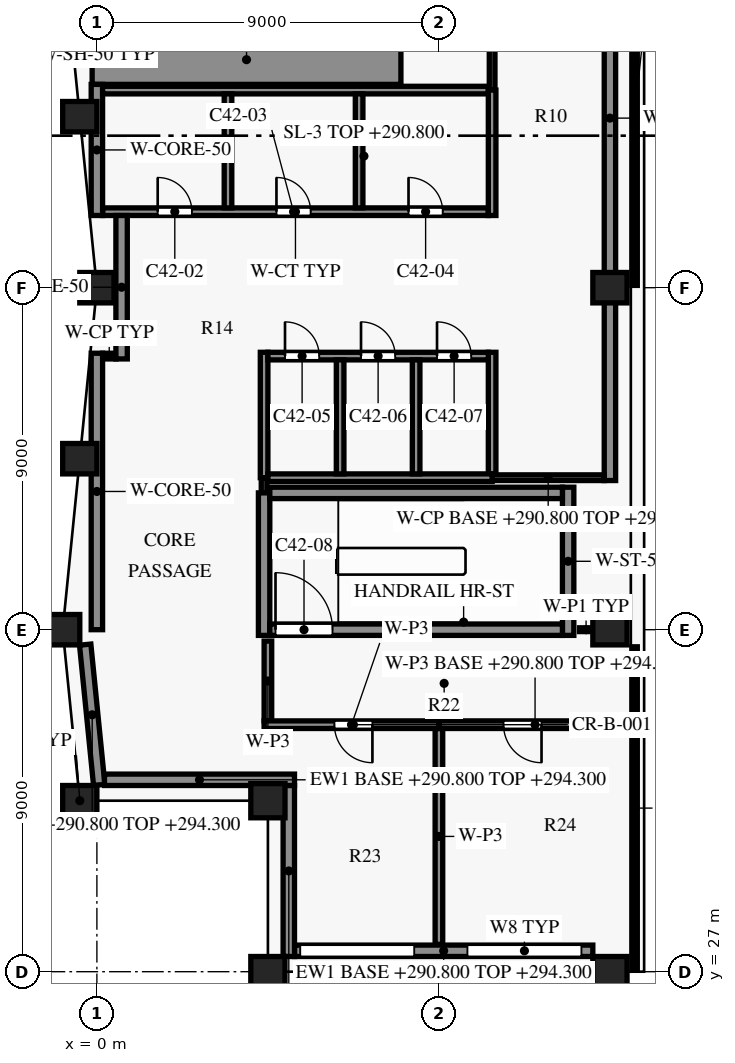
"""IFC4 building model, lengths in metres.
Left out: names, types, materials, properties, quantities, classifications, styles, units other than length and angle.
Written with IfcOpenShell. Run it as: python <this file> out.ifc"""

import sys

from ifc_helpers import new_model, si_unit, direction, frame, frame_2d, origin, origin_2d, place, context, subcontext, project, spatial, rectangle, extrude, element, fill, save


model = new_model("IFC4")
c1 = context("Model", 3, precision=1e-05, world=origin(), true_north=direction((0.0, 1.0)))
c2 = subcontext(c1, "Body", "Model", "MODEL_VIEW")
j1 = project(units=[si_unit("LENGTHUNIT", "METRE"), si_unit("PLANEANGLEUNIT", "RADIAN")], contexts=[c1])
p1 = place(None, origin())
s1 = spatial("IfcSite", under=j1, at=p1, CompositionType="ELEMENT")
p2 = place(p1, origin())
s2 = spatial("IfcBuilding", under=s1, at=p2, CompositionType="ELEMENT")
p3 = place(p2, frame((0.0, 0.0, 290.8)))
s3 = spatial("IfcBuildingStorey", under=s2, at=p3, CompositionType="ELEMENT", Elevation=290.8)
for number, where, z_axis, x_axis in (
    (1, (4.5, 27.0, 0.0), (0.0, 0.0, 1.0), (1.0, 0.0, 0.0)),
    (2, (13.5, 27.0, 0.0), (0.0, 0.0, 1.0), (1.0, 0.0, 0.0)),
    (3, (13.5, 36.0, 0.0), (0.0, 0.0, 1.0), (1.0, 0.0, 0.0)),
    (4, (13.5, 45.0, 0.0), (0.0, 0.0, 1.0), (1.0, 0.0, 0.0)),
    (5, (-0.45, 49.5, 0.0), (0.0, 0.0, 1.0), (0.1, -0.995, 0.0)),
    (6, (0.0, 45.0, 0.0), (0.0, 0.0, 1.0), (0.0, -1.0, 0.0)),
    (7, (-0.45, 40.5, 0.0), (0.0, 0.0, 1.0), (-0.1, -0.995, 0.0)),
    (8, (-0.9, 36.0, 0.0), (0.0, 0.0, 1.0), (0.0, -1.0, 0.0)),
    (9, (-0.45, 31.5, 0.0), (0.0, 0.0, 1.0), (0.1, -0.995, 0.0)),
):
    element("IfcColumn", number, at=place(p3, frame(where, z_axis=z_axis, x_axis=x_axis)), inside=s3, PredefinedType="COLUMN", context=c2, shape_type="SweptSolid", body=[
        extrude(rectangle(XDim=0.9, YDim=0.8, at=origin_2d()), origin(), (0.0, 0.0, 1.0), 4.0),
    ])
p4 = place(p3, frame((4.5, 31.5, 0.0), z_axis=(0.0, 0.0, 1.0), x_axis=(1.0, 0.0, 0.0)))
e10 = element("IfcColumn", 10, at=p4, inside=s3, PredefinedType="COLUMN", context=c2, shape_type="SweptSolid", body=[
    extrude(rectangle(XDim=0.9, YDim=0.9, at=origin_2d()), origin(), (0.0, 0.0, 1.0), 4.0),
])
p5 = place(p3, frame((13.05, 27.55, 0.0), z_axis=(0.0, 0.0, 1.0), x_axis=(-1.0, 0.0, 0.0)))
e11 = element("IfcWall", 11, at=p5, inside=s3, PredefinedType="SOLIDWALL", context=c2, shape_type="SweptSolid", body=[
    extrude(rectangle(XDim=7.85, YDim=0.3, at=frame_2d((3.925, 0.0))), origin(), (0.0, 0.0, 1.0), 3.5),
])
p6 = place(p5, frame((0.3, 0.0, 0.9)))
e12 = element("IfcOpeningElement", 12, at=p6, cuts=e11, PredefinedType="OPENING", context=c2, shape_type="SweptSolid", body=[
    extrude(rectangle(XDim=3.0, YDim=1.8, at=frame_2d((1.5, 0.9))), frame((0.0, 0.16, 0.0), z_axis=(0.0, -1.0, 0.0), x_axis=(1.0, 0.0, 0.0)), (0.0, 0.0, 1.0), 0.32),
])
p7 = place(p5, frame((4.7, 0.0, 0.9)))
e13 = element("IfcOpeningElement", 13, at=p7, cuts=e11, PredefinedType="OPENING", context=c2, shape_type="SweptSolid", body=[
    extrude(rectangle(XDim=3.0, YDim=1.8, at=frame_2d((1.5, 0.9))), frame((0.0, 0.16, 0.0), z_axis=(0.0, -1.0, 0.0), x_axis=(1.0, 0.0, 0.0)), (0.0, 0.0, 1.0), 0.32),
])
p8 = place(p3, frame((0.061, 31.915, 0.0), z_axis=(0.0, 0.0, 1.0), x_axis=(-0.099549320092, 0.995032629048, 0.0)))
e14 = element("IfcWall", 14, at=p8, inside=s3, PredefinedType="SOLIDWALL", context=c2, shape_type="SweptSolid", body=[
    extrude(rectangle(XDim=3.71, YDim=0.3, at=frame_2d((1.855, 0.0))), origin(), (0.0, 0.0, 1.0), 3.5),
])
p9 = place(p3, frame((5.2, 32.05, 0.0), z_axis=(0.0, 0.0, 1.0), x_axis=(-1.0, 0.0, 0.0)))
e15 = element("IfcWall", 15, at=p9, inside=s3, PredefinedType="SOLIDWALL", context=c2, shape_type="SweptSolid", body=[
    extrude(rectangle(XDim=5.0, YDim=0.3, at=frame_2d((2.5, 0.0))), origin(), (0.0, 0.0, 1.0), 3.5),
])
p10 = place(p3, frame((5.05, 27.4, 0.0), z_axis=(0.0, 0.0, 1.0), x_axis=(0.0, 1.0, 0.0)))
e16 = element("IfcWall", 16, at=p10, inside=s3, PredefinedType="SOLIDWALL", context=c2, shape_type="SweptSolid", body=[
    extrude(rectangle(XDim=4.502, YDim=0.3, at=frame_2d((2.251, 0.0))), origin(), (0.0, 0.0, 1.0), 3.5),
])
p11 = place(p3, frame((4.55, 36.0, 0.0), z_axis=(0.0, 0.0, 1.0), x_axis=(1.0, 0.0, 0.0)))
e17 = element("IfcWall", 17, at=p11, inside=s3, PredefinedType="SHEAR", context=c2, shape_type="SweptSolid", body=[
    extrude(rectangle(XDim=7.7, YDim=0.3, at=frame_2d((3.85, 0.0))), origin(), (0.0, 0.0, 1.0), 3.7),
])
p12 = place(p11, frame((0.15, 0.0, 0.0)))
e18 = element("IfcOpeningElement", 18, at=p12, cuts=e17, PredefinedType="OPENING", context=c2, shape_type="SweptSolid", body=[
    extrude(rectangle(XDim=1.5, YDim=2.2, at=frame_2d((0.75, 1.1))), frame((0.0, 0.16, 0.0), z_axis=(0.0, -1.0, 0.0), x_axis=(1.0, 0.0, 0.0)), (0.0, 0.0, 1.0), 0.32),
])
p13 = place(p3, frame((4.55, 39.6, 0.0), z_axis=(0.0, 0.0, 1.0), x_axis=(1.0, 0.0, 0.0)))
e19 = element("IfcWall", 19, at=p13, inside=s3, PredefinedType="SHEAR", context=c2, shape_type="SweptSolid", body=[
    extrude(rectangle(XDim=7.7, YDim=0.3, at=frame_2d((3.85, 0.0))), origin(), (0.0, 0.0, 1.0), 3.7),
])
p14 = place(p3, frame((10.4, 40.0, 0.0), z_axis=(0.0, 0.0, 1.0), x_axis=(1.0, 0.0, 0.0)))
e20 = element("IfcWall", 20, at=p14, inside=s3, PredefinedType="PARTITIONING", context=c2, shape_type="SweptSolid", body=[
    extrude(rectangle(XDim=2.95, YDim=0.15, at=frame_2d((1.475, 0.0))), origin(), (0.0, 0.0, 1.0), 3.35),
])
p15 = place(p3, frame((4.5, 40.0, 0.0), z_axis=(0.0, 0.0, 1.0), x_axis=(1.0, 0.0, 0.0)))
e21 = element("IfcWall", 21, at=p15, inside=s3, PredefinedType="PARTITIONING", context=c2, shape_type="SweptSolid", body=[
    extrude(rectangle(XDim=5.9, YDim=0.2, at=frame_2d((2.95, 0.0))), origin(), (0.0, 0.0, 1.0), 3.7),
])
p16 = place(p3, frame((0.15, 43.2, 0.0), z_axis=(0.0, 0.0, 1.0), x_axis=(1.0, 0.0, 0.0)))
e22 = element("IfcWall", 22, at=p16, inside=s3, PredefinedType="PARTITIONING", context=c2, shape_type="SweptSolid", body=[
    extrude(rectangle(XDim=0.35, YDim=0.15, at=frame_2d((0.175, 0.0))), origin(), (0.0, 0.0, 1.0), 3.7),
])
p17 = place(p3, frame((4.5, 43.2, 0.0), z_axis=(0.0, 0.0, 1.0), x_axis=(1.0, 0.0, 0.0)))
e23 = element("IfcWall", 23, at=p17, inside=s3, PredefinedType="PARTITIONING", context=c2, shape_type="SweptSolid", body=[
    extrude(rectangle(XDim=5.8, YDim=0.2, at=frame_2d((2.9, 0.0))), origin(), (0.0, 0.0, 1.0), 3.7),
])
p18 = place(p17, frame((0.45, 0.0, 0.0)))
e24 = element("IfcOpeningElement", 24, at=p18, cuts=e23, PredefinedType="OPENING", context=c2, shape_type="SweptSolid", body=[
    extrude(rectangle(XDim=0.9, YDim=2.1, at=frame_2d((0.45, 1.05))), frame((0.0, 0.11, 0.0), z_axis=(0.0, -1.0, 0.0), x_axis=(1.0, 0.0, 0.0)), (0.0, 0.0, 1.0), 0.22),
])
p19 = place(p17, frame((2.45, 0.0, 0.0)))
e25 = element("IfcOpeningElement", 25, at=p19, cuts=e23, PredefinedType="OPENING", context=c2, shape_type="SweptSolid", body=[
    extrude(rectangle(XDim=0.9, YDim=2.1, at=frame_2d((0.45, 1.05))), frame((0.0, 0.11, 0.0), z_axis=(0.0, -1.0, 0.0), x_axis=(1.0, 0.0, 0.0)), (0.0, 0.0, 1.0), 0.22),
])
p20 = place(p17, frame((4.45, 0.0, 0.0)))
e26 = element("IfcOpeningElement", 26, at=p20, cuts=e23, PredefinedType="OPENING", context=c2, shape_type="SweptSolid", body=[
    extrude(rectangle(XDim=0.9, YDim=2.1, at=frame_2d((0.45, 1.05))), frame((0.0, 0.11, 0.0), z_axis=(0.0, -1.0, 0.0), x_axis=(1.0, 0.0, 0.0)), (0.0, 0.0, 1.0), 0.22),
])
p21 = place(p3, frame((0.15, 47.0, 0.0), z_axis=(0.0, 0.0, 1.0), x_axis=(1.0, 0.0, 0.0)))
e27 = element("IfcWall", 27, at=p21, inside=s3, PredefinedType="PARTITIONING", context=c2, shape_type="SweptSolid", body=[
    extrude(rectangle(XDim=10.15, YDim=0.2, at=frame_2d((5.075, 0.0))), origin(), (0.0, 0.0, 1.0), 3.7),
])
p22 = place(p21, frame((1.45, 0.0, 0.0)))
e28 = element("IfcOpeningElement", 28, at=p22, cuts=e27, PredefinedType="OPENING", context=c2, shape_type="SweptSolid", body=[
    extrude(rectangle(XDim=0.9, YDim=2.1, at=frame_2d((0.45, 1.05))), frame((0.0, 0.11, 0.0), z_axis=(0.0, -1.0, 0.0), x_axis=(1.0, 0.0, 0.0)), (0.0, 0.0, 1.0), 0.22),
])
p23 = place(p21, frame((4.575, 0.0, 0.0)))
e29 = element("IfcOpeningElement", 29, at=p23, cuts=e27, PredefinedType="OPENING", context=c2, shape_type="SweptSolid", body=[
    extrude(rectangle(XDim=0.9, YDim=2.1, at=frame_2d((0.45, 1.05))), frame((0.0, 0.11, 0.0), z_axis=(0.0, -1.0, 0.0), x_axis=(1.0, 0.0, 0.0)), (0.0, 0.0, 1.0), 0.22),
])
p24 = place(p21, frame((8.05, 0.0, 0.0)))
e30 = element("IfcOpeningElement", 30, at=p24, cuts=e27, PredefinedType="OPENING", context=c2, shape_type="SweptSolid", body=[
    extrude(rectangle(XDim=0.9, YDim=2.1, at=frame_2d((0.45, 1.05))), frame((0.0, 0.11, 0.0), z_axis=(0.0, -1.0, 0.0), x_axis=(1.0, 0.0, 0.0)), (0.0, 0.0, 1.0), 0.22),
])
p25 = place(p3, frame((0.15, 50.2, 0.0), z_axis=(0.0, 0.0, 1.0), x_axis=(1.0, 0.0, 0.0)))
e31 = element("IfcWall", 31, at=p25, inside=s3, PredefinedType="PARTITIONING", context=c2, shape_type="SweptSolid", body=[
    extrude(rectangle(XDim=10.15, YDim=0.2, at=frame_2d((5.075, 0.0))), origin(), (0.0, 0.0, 1.0), 3.7),
])
p26 = place(p3, frame((-0.125, 51.0, 0.0), z_axis=(0.0, 0.0, 1.0), x_axis=(1.0, 0.0, 0.0)))
e32 = element("IfcWall", 32, at=p26, inside=s3, PredefinedType="SHEAR", context=c2, shape_type="SweptSolid", body=[
    extrude(rectangle(XDim=8.125, YDim=1.3, at=frame_2d((4.062, 0.0))), origin(), (0.0, 0.0, 1.0), 3.7),
])
p27 = place(p3, frame((0.0, 36.0, 0.0), z_axis=(0.0, 0.0, 1.0), x_axis=(0.0, 1.0, 0.0)))
e33 = element("IfcWall", 33, at=p27, inside=s3, PredefinedType="SHEAR", context=c2, shape_type="SweptSolid", body=[
    extrude(rectangle(XDim=7.275, YDim=0.3, at=frame_2d((3.637, 0.0))), origin(), (0.0, 0.0, 1.0), 3.7),
])
p28 = place(p3, frame((0.0, 46.9, 0.0), z_axis=(0.0, 0.0, 1.0), x_axis=(0.0, 1.0, 0.0)))
e34 = element("IfcWall", 34, at=p28, inside=s3, PredefinedType="SHEAR", context=c2, shape_type="SweptSolid", body=[
    extrude(rectangle(XDim=3.45, YDim=0.3, at=frame_2d((1.725, 0.0))), origin(), (0.0, 0.0, 1.0), 3.7),
])
p29 = place(p3, frame((0.65, 43.125, 0.0), z_axis=(0.0, 0.0, 1.0), x_axis=(0.0, 1.0, 0.0)))
e35 = element("IfcWall", 35, at=p29, inside=s3, PredefinedType="SHEAR", context=c2, shape_type="SweptSolid", body=[
    extrude(rectangle(XDim=3.775, YDim=0.3, at=frame_2d((1.887, 0.0))), origin(), (0.0, 0.0, 1.0), 3.7),
])
p30 = place(p3, frame((3.45, 47.1, 0.0), z_axis=(0.0, 0.0, 1.0), x_axis=(0.0, 1.0, 0.0)))
e36 = element("IfcWall", 36, at=p30, inside=s3, PredefinedType="PARTITIONING", context=c2, shape_type="SweptSolid", body=[
    extrude(rectangle(XDim=3.0, YDim=0.2, at=frame_2d((1.5, 0.0))), origin(), (0.0, 0.0, 1.0), 3.7),
])
p31 = place(p3, frame((4.4, 39.6, 0.0), z_axis=(0.0, 0.0, 1.0), x_axis=(0.0, 1.0, 0.0)))
e37 = element("IfcWall", 37, at=p31, inside=s3, PredefinedType="PARTITIONING", context=c2, shape_type="SweptSolid", body=[
    extrude(rectangle(XDim=0.4, YDim=0.15, at=frame_2d((0.2, 0.0))), origin(), (0.0, 0.0, 1.0), 3.7),
])
p32 = place(p3, frame((4.4, 40.0, 0.0), z_axis=(0.0, 0.0, 1.0), x_axis=(0.0, 1.0, 0.0)))
e38 = element("IfcWall", 38, at=p32, inside=s3, PredefinedType="PARTITIONING", context=c2, shape_type="SweptSolid", body=[
    extrude(rectangle(XDim=3.3, YDim=0.2, at=frame_2d((1.65, 0.0))), origin(), (0.0, 0.0, 1.0), 3.7),
])
p33 = place(p3, frame((4.4, 35.85, 0.0), z_axis=(0.0, 0.0, 1.0), x_axis=(0.0, 1.0, 0.0)))
e39 = element("IfcWall", 39, at=p33, inside=s3, PredefinedType="SHEAR", context=c2, shape_type="SweptSolid", body=[
    extrude(rectangle(XDim=3.75, YDim=0.3, at=frame_2d((1.875, 0.0))), origin(), (0.0, 0.0, 1.0), 3.7),
])
for number, where, z_axis, x_axis in (
    (40, (6.4, 40.1, 0.0), (0.0, 0.0, 1.0), (0.0, 1.0, 0.0)),
    (41, (6.9, 47.1, 0.0), (0.0, 0.0, 1.0), (0.0, 1.0, 0.0)),
    (42, (8.4, 40.1, 0.0), (0.0, 0.0, 1.0), (0.0, 1.0, 0.0)),
):
    element("IfcWall", number, at=place(p3, frame(where, z_axis=z_axis, x_axis=x_axis)), inside=s3, PredefinedType="PARTITIONING", context=c2, shape_type="SweptSolid", body=[
        extrude(rectangle(XDim=3.0, YDim=0.2, at=frame_2d((1.5, 0.0))), origin(), (0.0, 0.0, 1.0), 3.7),
    ])
p34 = place(p3, frame((10.4, 50.2, 0.0), z_axis=(0.0, 0.0, 1.0), x_axis=(0.0, 1.0, 0.0)))
e43 = element("IfcWall", 43, at=p34, inside=s3, PredefinedType="PARTITIONING", context=c2, shape_type="SweptSolid", body=[
    extrude(rectangle(XDim=1.675, YDim=0.15, at=frame_2d((0.837, 0.0))), origin(), (0.0, 0.0, 1.0), 3.7),
])
p35 = place(p3, frame((10.4, 40.1, 0.0), z_axis=(0.0, 0.0, 1.0), x_axis=(0.0, 1.0, 0.0)))
e44 = element("IfcWall", 44, at=p35, inside=s3, PredefinedType="PARTITIONING", context=c2, shape_type="SweptSolid", body=[
    extrude(rectangle(XDim=3.2, YDim=0.2, at=frame_2d((1.6, 0.0))), origin(), (0.0, 0.0, 1.0), 3.7),
])
p36 = place(p3, frame((10.4, 46.9, 0.0), z_axis=(0.0, 0.0, 1.0), x_axis=(0.0, 1.0, 0.0)))
e45 = element("IfcWall", 45, at=p36, inside=s3, PredefinedType="PARTITIONING", context=c2, shape_type="SweptSolid", body=[
    extrude(rectangle(XDim=3.3, YDim=0.2, at=frame_2d((1.65, 0.0))), origin(), (0.0, 0.0, 1.0), 3.7),
])
p37 = place(p3, frame((12.4, 35.85, 0.0), z_axis=(0.0, 0.0, 1.0), x_axis=(0.0, 1.0, 0.0)))
e46 = element("IfcWall", 46, at=p37, inside=s3, PredefinedType="SHEAR", context=c2, shape_type="SweptSolid", body=[
    extrude(rectangle(XDim=3.9, YDim=0.3, at=frame_2d((1.95, 0.0))), origin(), (0.0, 0.0, 1.0), 3.7),
])
p38 = place(p3, frame((13.5, 39.925, 0.0), z_axis=(0.0, 0.0, 1.0), x_axis=(0.0, 1.0, 0.0)))
e47 = element("IfcWall", 47, at=p38, inside=s3, PredefinedType="SHEAR", context=c2, shape_type="SweptSolid", body=[
    extrude(rectangle(XDim=19.075, YDim=0.3, at=frame_2d((9.538, 0.0))), origin(), (0.0, 0.0, 1.0), 3.7),
])
p39 = place(p3, frame((9.0, 33.4, 0.0), z_axis=(0.0, 0.0, 1.0), x_axis=(0.0, -1.0, 0.0)))
e48 = element("IfcWall", 48, at=p39, inside=s3, PredefinedType="PARTITIONING", context=c2, shape_type="SweptSolid", body=[
    extrude(rectangle(XDim=5.68, YDim=0.2, at=frame_2d((2.84, 0.0))), origin(), (0.0, 0.0, 1.0), 3.68),
])
p40 = place(p3, frame((9.0, 33.5, 0.0), z_axis=(0.0, 0.0, 1.0), x_axis=(-1.0, 0.0, 0.0)))
e49 = element("IfcWall", 49, at=p40, inside=s3, PredefinedType="PARTITIONING", context=c2, shape_type="SweptSolid", body=[
    extrude(rectangle(XDim=4.6, YDim=0.2, at=frame_2d((2.3, 0.0))), origin(), (0.0, 0.0, 1.0), 3.68),
])
p41 = place(p40, frame((1.75, 0.0, 0.0)))
e50 = element("IfcOpeningElement", 50, at=p41, cuts=e49, PredefinedType="OPENING", context=c2, shape_type="SweptSolid", body=[
    extrude(rectangle(XDim=1.0, YDim=2.1, at=frame_2d((0.5, 1.05))), frame((0.0, 0.11, 0.0), z_axis=(0.0, -1.0, 0.0), x_axis=(1.0, 0.0, 0.0)), (0.0, 0.0, 1.0), 0.22),
])
p42 = place(p3, frame((14.06, 33.5, 0.0), z_axis=(0.0, 0.0, 1.0), x_axis=(-1.0, 0.0, 0.0)))
e51 = element("IfcWall", 51, at=p42, inside=s3, PredefinedType="PARTITIONING", context=c2, shape_type="SweptSolid", body=[
    extrude(rectangle(XDim=5.06, YDim=0.2, at=frame_2d((2.53, 0.0))), origin(), (0.0, 0.0, 1.0), 3.33),
])
p43 = place(p42, frame((2.36, 0.0, 0.0)))
e52 = element("IfcOpeningElement", 52, at=p43, cuts=e51, PredefinedType="OPENING", context=c2, shape_type="SweptSolid", body=[
    extrude(rectangle(XDim=1.0, YDim=2.1, at=frame_2d((0.5, 1.05))), frame((0.0, 0.11, 0.0), z_axis=(0.0, -1.0, 0.0), x_axis=(1.0, 0.0, 0.0)), (0.0, 0.0, 1.0), 0.22),
])
p44 = place(p3, frame((4.5, 33.6, 0.0), z_axis=(0.0, 0.0, 1.0), x_axis=(0.0, 1.0, 0.0)))
e53 = element("IfcWall", 53, at=p44, inside=s3, PredefinedType="PARTITIONING", context=c2, shape_type="SweptSolid", body=[
    extrude(rectangle(XDim=2.1, YDim=0.2, at=frame_2d((1.05, 0.0))), origin(), (0.0, 0.0, 1.0), 3.68),
])
p45 = place(p3, frame((12.7, 36.0, 0.0), z_axis=(0.0, 0.0, 1.0), x_axis=(1.0, 0.0, 0.0)))
e54 = element("IfcWall", 54, at=p45, inside=s3, PredefinedType="PARTITIONING", context=c2, shape_type="SweptSolid", body=[
    extrude(rectangle(XDim=0.345, YDim=0.1, at=frame_2d((0.172, 0.0))), origin(), (0.0, 0.0, 1.0), 3.68),
])
p46 = place(p6, origin())
e55 = element("IfcWindow", 55, at=p46, inside=s3, PartitioningType="SINGLE_PANEL", PredefinedType="WINDOW", context=c2, shape_type="SweptSolid", body=[
    extrude(rectangle(XDim=3.0, YDim=1.8, at=frame_2d((1.5, 0.9))), frame((0.0, 0.03, 0.0), z_axis=(0.0, -1.0, 0.0), x_axis=(1.0, 0.0, 0.0)), (0.0, 0.0, 1.0), 0.06),
])
fill(e12, e55)
p47 = place(p7, origin())
e56 = element("IfcWindow", 56, at=p47, inside=s3, PartitioningType="SINGLE_PANEL", PredefinedType="WINDOW", context=c2, shape_type="SweptSolid", body=[
    extrude(rectangle(XDim=3.0, YDim=1.8, at=frame_2d((1.5, 0.9))), frame((0.0, 0.03, 0.0), z_axis=(0.0, -1.0, 0.0), x_axis=(1.0, 0.0, 0.0)), (0.0, 0.0, 1.0), 0.06),
])
fill(e13, e56)
p48 = place(p22, origin())
e57 = element("IfcDoor", 57, at=p48, inside=s3, OperationType="SINGLE_SWING_RIGHT", PredefinedType="DOOR", context=c2, shape_type="SweptSolid", body=[
    extrude(rectangle(XDim=0.9, YDim=2.1, at=frame_2d((0.45, 1.05))), frame((0.0, 0.025, 0.0), z_axis=(0.0, -1.0, 0.0), x_axis=(1.0, 0.0, 0.0)), (0.0, 0.0, 1.0), 0.05),
])
fill(e28, e57)
p49 = place(p23, origin())
e58 = element("IfcDoor", 58, at=p49, inside=s3, OperationType="SINGLE_SWING_LEFT", PredefinedType="DOOR", context=c2, shape_type="SweptSolid", body=[
    extrude(rectangle(XDim=0.9, YDim=2.1, at=frame_2d((0.45, 1.05))), frame((0.0, 0.025, 0.0), z_axis=(0.0, -1.0, 0.0), x_axis=(1.0, 0.0, 0.0)), (0.0, 0.0, 1.0), 0.05),
])
fill(e29, e58)
p50 = place(p24, origin())
e59 = element("IfcDoor", 59, at=p50, inside=s3, OperationType="SINGLE_SWING_RIGHT", PredefinedType="DOOR", context=c2, shape_type="SweptSolid", body=[
    extrude(rectangle(XDim=0.9, YDim=2.1, at=frame_2d((0.45, 1.05))), frame((0.0, 0.025, 0.0), z_axis=(0.0, -1.0, 0.0), x_axis=(1.0, 0.0, 0.0)), (0.0, 0.0, 1.0), 0.05),
])
fill(e30, e59)
p51 = place(p18, origin())
e60 = element("IfcDoor", 60, at=p51, inside=s3, OperationType="SINGLE_SWING_LEFT", PredefinedType="DOOR", context=c2, shape_type="SweptSolid", body=[
    extrude(rectangle(XDim=0.9, YDim=2.1, at=frame_2d((0.45, 1.05))), frame((0.0, 0.025, 0.0), z_axis=(0.0, -1.0, 0.0), x_axis=(1.0, 0.0, 0.0)), (0.0, 0.0, 1.0), 0.05),
])
fill(e24, e60)
p52 = place(p19, origin())
e61 = element("IfcDoor", 61, at=p52, inside=s3, OperationType="SINGLE_SWING_RIGHT", PredefinedType="DOOR", context=c2, shape_type="SweptSolid", body=[
    extrude(rectangle(XDim=0.9, YDim=2.1, at=frame_2d((0.45, 1.05))), frame((0.0, 0.025, 0.0), z_axis=(0.0, -1.0, 0.0), x_axis=(1.0, 0.0, 0.0)), (0.0, 0.0, 1.0), 0.05),
])
fill(e25, e61)
p53 = place(p20, origin())
e62 = element("IfcDoor", 62, at=p53, inside=s3, OperationType="SINGLE_SWING_LEFT", PredefinedType="DOOR", context=c2, shape_type="SweptSolid", body=[
    extrude(rectangle(XDim=0.9, YDim=2.1, at=frame_2d((0.45, 1.05))), frame((0.0, 0.025, 0.0), z_axis=(0.0, -1.0, 0.0), x_axis=(1.0, 0.0, 0.0)), (0.0, 0.0, 1.0), 0.05),
])
fill(e26, e62)
p54 = place(p12, origin())
e63 = element("IfcDoor", 63, at=p54, inside=s3, OperationType="SINGLE_SWING_RIGHT", PredefinedType="DOOR", context=c2, shape_type="SweptSolid", body=[
    extrude(rectangle(XDim=1.5, YDim=2.2, at=frame_2d((0.75, 1.1))), frame((0.0, 0.025, 0.0), z_axis=(0.0, -1.0, 0.0), x_axis=(1.0, 0.0, 0.0)), (0.0, 0.0, 1.0), 0.05),
])
fill(e18, e63)
p55 = place(p41, origin())
e64 = element("IfcDoor", 64, at=p55, inside=s3, OperationType="SINGLE_SWING_RIGHT", PredefinedType="DOOR", context=c2, shape_type="SweptSolid", body=[
    extrude(rectangle(XDim=1.0, YDim=2.1, at=frame_2d((0.5, 1.05))), frame((0.0, 0.025, 0.0), z_axis=(0.0, -1.0, 0.0), x_axis=(1.0, 0.0, 0.0)), (0.0, 0.0, 1.0), 0.05),
])
fill(e50, e64)
p56 = place(p43, origin())
e65 = element("IfcDoor", 65, at=p56, inside=s3, OperationType="SINGLE_SWING_LEFT", PredefinedType="DOOR", context=c2, shape_type="SweptSolid", body=[
    extrude(rectangle(XDim=1.0, YDim=2.1, at=frame_2d((0.5, 1.05))), frame((0.0, 0.025, 0.0), z_axis=(0.0, -1.0, 0.0), x_axis=(1.0, 0.0, 0.0)), (0.0, 0.0, 1.0), 0.05),
])
fill(e52, e65)
save(model, sys.argv[1])
